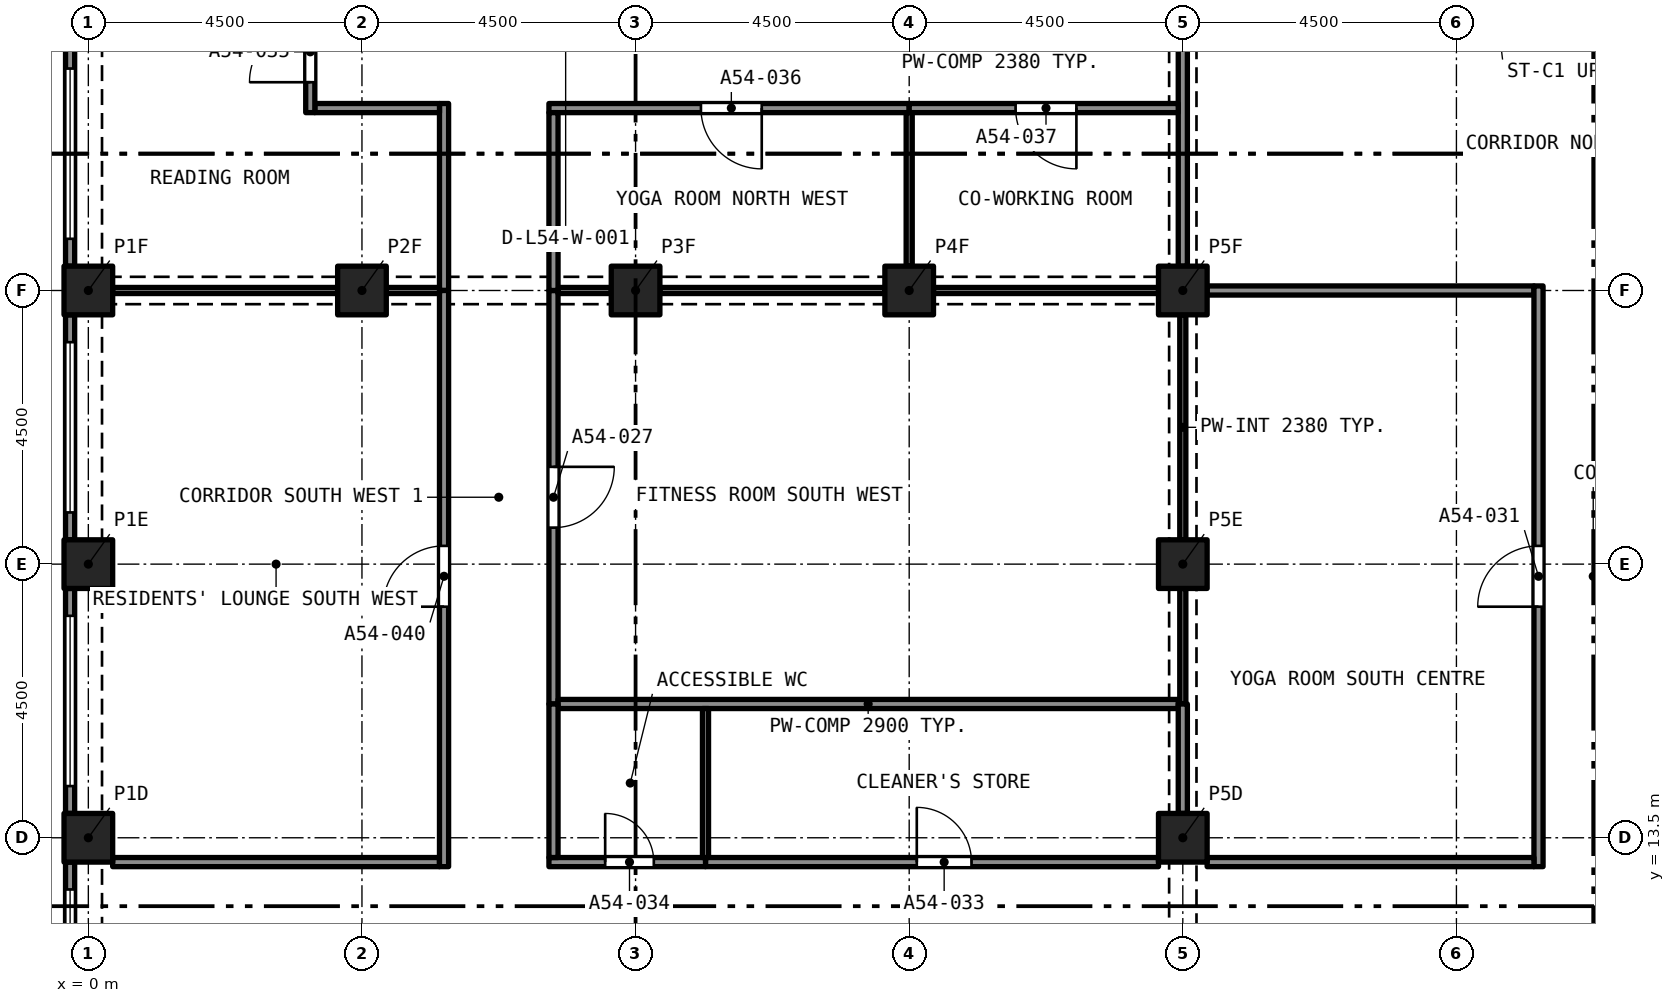
"""IFC4 building model, lengths in metres.
Left out: names, types, materials, properties, quantities, classifications, styles, units other than length and angle.
Written with IfcOpenShell. Run it as: python <this file> out.ifc"""

import sys

from ifc_helpers import new_model, si_unit, direction, frame, frame_2d, origin, origin_2d, place, context, subcontext, project, spatial, rectangle, extrude, element, fill, save


model = new_model("IFC4")
c1 = context("Model", 3, precision=1e-05, world=origin(), true_north=direction((0.0, 1.0)))
c2 = subcontext(c1, "Body", "Model", "MODEL_VIEW")
j1 = project(units=[si_unit("LENGTHUNIT", "METRE"), si_unit("PLANEANGLEUNIT", "RADIAN")], contexts=[c1])
p1 = place(None, origin())
s1 = spatial("IfcSite", under=j1, at=p1, CompositionType="ELEMENT")
p2 = place(p1, origin())
s2 = spatial("IfcBuilding", under=s1, at=p2, CompositionType="ELEMENT")
p3 = place(p2, frame((0.0, 0.0, 195.5)))
s3 = spatial("IfcBuildingStorey", under=s2, at=p3, CompositionType="ELEMENT", Elevation=195.5)
for number, where, z_axis, x_axis in (
    (1, (0.0, 13.5, 0.0), (0.0, 0.0, 1.0), (1.0, 0.0, 0.0)),
    (2, (18.0, 13.5, 0.0), (0.0, 0.0, 1.0), (1.0, 0.0, 0.0)),
    (3, (0.0, 18.0, 0.0), (0.0, 0.0, 1.0), (1.0, 0.0, 0.0)),
    (4, (18.0, 18.0, 0.0), (0.0, 0.0, 1.0), (1.0, 0.0, 0.0)),
    (5, (0.0, 22.5, 0.0), (0.0, 0.0, 1.0), (1.0, 0.0, 0.0)),
    (6, (4.5, 22.5, 0.0), (0.0, 0.0, 1.0), (1.0, 0.0, 0.0)),
    (7, (9.0, 22.5, 0.0), (0.0, 0.0, 1.0), (1.0, 0.0, 0.0)),
    (8, (13.5, 22.5, 0.0), (0.0, 0.0, 1.0), (1.0, 0.0, 0.0)),
    (9, (18.0, 22.5, 0.0), (0.0, 0.0, 1.0), (1.0, 0.0, 0.0)),
):
    element("IfcColumn", number, at=place(p3, frame(where, z_axis=z_axis, x_axis=x_axis)), inside=s3, PredefinedType="COLUMN", context=c2, shape_type="SweptSolid", body=[
        extrude(rectangle(XDim=0.8, YDim=0.8, at=origin_2d()), origin(), (0.0, 0.0, 1.0), 3.2),
    ])
p4 = place(p3, frame((-0.3, 22.9, 0.0), z_axis=(0.0, 0.0, 1.0), x_axis=(0.0, 1.0, 0.0)))
e10 = element("IfcWall", 10, at=p4, inside=s3, PredefinedType="SOLIDWALL", context=c2, shape_type="SweptSolid", body=[
    extrude(rectangle(XDim=3.7, YDim=0.15, at=frame_2d((1.85, 0.0))), origin(), (0.0, 0.0, 1.0), 3.2),
])
p5 = place(p4, frame((0.45, 0.0, 0.45)))
e11 = element("IfcOpeningElement", 11, at=p5, cuts=e10, PredefinedType="OPENING", context=c2, shape_type="SweptSolid", body=[
    extrude(rectangle(XDim=2.8, YDim=1.95, at=frame_2d((1.4, 0.975))), frame((0.0, 0.085, 0.0), z_axis=(0.0, -1.0, 0.0), x_axis=(1.0, 0.0, 0.0)), (0.0, 0.0, 1.0), 0.17),
])
p6 = place(p3, frame((-0.3, 18.4, 0.0), z_axis=(0.0, 0.0, 1.0), x_axis=(0.0, 1.0, 0.0)))
e12 = element("IfcWall", 12, at=p6, inside=s3, PredefinedType="SOLIDWALL", context=c2, shape_type="SweptSolid", body=[
    extrude(rectangle(XDim=3.7, YDim=0.15, at=frame_2d((1.85, 0.0))), origin(), (0.0, 0.0, 1.0), 3.2),
])
p7 = place(p6, frame((0.45, 0.0, 0.45)))
e13 = element("IfcOpeningElement", 13, at=p7, cuts=e12, PredefinedType="OPENING", context=c2, shape_type="SweptSolid", body=[
    extrude(rectangle(XDim=2.8, YDim=1.95, at=frame_2d((1.4, 0.975))), frame((0.0, 0.085, 0.0), z_axis=(0.0, -1.0, 0.0), x_axis=(1.0, 0.0, 0.0)), (0.0, 0.0, 1.0), 0.17),
])
p8 = place(p3, frame((-0.3, 13.9, 0.0), z_axis=(0.0, 0.0, 1.0), x_axis=(0.0, 1.0, 0.0)))
e14 = element("IfcWall", 14, at=p8, inside=s3, PredefinedType="SOLIDWALL", context=c2, shape_type="SweptSolid", body=[
    extrude(rectangle(XDim=3.7, YDim=0.15, at=frame_2d((1.85, 0.0))), origin(), (0.0, 0.0, 1.0), 3.2),
])
p9 = place(p8, frame((0.45, 0.0, 0.45)))
e15 = element("IfcOpeningElement", 15, at=p9, cuts=e14, PredefinedType="OPENING", context=c2, shape_type="SweptSolid", body=[
    extrude(rectangle(XDim=2.8, YDim=1.95, at=frame_2d((1.4, 0.975))), frame((0.0, 0.085, 0.0), z_axis=(0.0, -1.0, 0.0), x_axis=(1.0, 0.0, 0.0)), (0.0, 0.0, 1.0), 0.17),
])
p10 = place(p3, frame((-0.3, 9.4, 0.0), z_axis=(0.0, 0.0, 1.0), x_axis=(0.0, 1.0, 0.0)))
e16 = element("IfcWall", 16, at=p10, inside=s3, PredefinedType="SOLIDWALL", context=c2, shape_type="SweptSolid", body=[
    extrude(rectangle(XDim=3.7, YDim=0.15, at=frame_2d((1.85, 0.0))), origin(), (0.0, 0.0, 1.0), 3.2),
])
p11 = place(p10, frame((0.45, 0.0, 0.45)))
e17 = element("IfcOpeningElement", 17, at=p11, cuts=e16, PredefinedType="OPENING", context=c2, shape_type="SweptSolid", body=[
    extrude(rectangle(XDim=2.8, YDim=1.95, at=frame_2d((1.4, 0.975))), frame((0.0, 0.085, 0.0), z_axis=(0.0, -1.0, 0.0), x_axis=(1.0, 0.0, 0.0)), (0.0, 0.0, 1.0), 0.17),
])
p12 = place(p3, frame((18.0, 18.4, 0.0), z_axis=(0.0, 0.0, 1.0), x_axis=(0.0, 1.0, 0.0)))
e18 = element("IfcWall", 18, at=p12, inside=s3, PredefinedType="PARTITIONING", context=c2, shape_type="SweptSolid", body=[
    extrude(rectangle(XDim=3.7, YDim=0.1, at=frame_2d((1.85, 0.0))), origin(), (0.0, 0.0, 1.0), 2.38),
])
p13 = place(p3, frame((18.0, 15.7, 0.0), z_axis=(0.0, 0.0, 1.0), x_axis=(0.0, 1.0, 0.0)))
e19 = element("IfcWall", 19, at=p13, inside=s3, PredefinedType="PARTITIONING", context=c2, shape_type="SweptSolid", body=[
    extrude(rectangle(XDim=1.9, YDim=0.1, at=frame_2d((0.95, 0.0))), origin(), (0.0, 0.0, 1.0), 2.38),
])
p14 = place(p3, frame((7.65, 22.5, 0.0), z_axis=(0.0, 0.0, 1.0), x_axis=(0.0, -1.0, 0.0)))
e20 = element("IfcWall", 20, at=p14, inside=s3, PredefinedType="PARTITIONING", context=c2, shape_type="SweptSolid", body=[
    extrude(rectangle(XDim=6.8, YDim=0.15, at=frame_2d((3.4, 0.0))), origin(), (0.0, 0.0, 1.0), 2.9),
])
p15 = place(p14, frame((2.9, 0.0, 0.0)))
e21 = element("IfcOpeningElement", 21, at=p15, cuts=e20, PredefinedType="OPENING", context=c2, shape_type="SweptSolid", body=[
    extrude(rectangle(XDim=1.0, YDim=2.1, at=frame_2d((0.5, 1.05))), frame((0.0, 0.085, 0.0), z_axis=(0.0, -1.0, 0.0), x_axis=(1.0, 0.0, 0.0)), (0.0, 0.0, 1.0), 0.17),
])
p16 = place(p3, frame((7.725, 22.5, 0.0), z_axis=(0.0, 0.0, 1.0), x_axis=(1.0, 0.0, 0.0)))
e22 = element("IfcWall", 22, at=p16, inside=s3, PredefinedType="PARTITIONING", context=c2, shape_type="SweptSolid", body=[
    extrude(rectangle(XDim=0.875, YDim=0.1, at=frame_2d((0.438, 0.0))), origin(), (0.0, 0.0, 1.0), 2.38),
])
for number, where, z_axis, x_axis in (
    (23, (9.4, 22.5, 0.0), (0.0, 0.0, 1.0), (1.0, 0.0, 0.0)),
    (24, (13.9, 22.5, 0.0), (0.0, 0.0, 1.0), (1.0, 0.0, 0.0)),
):
    element("IfcWall", number, at=place(p3, frame(where, z_axis=z_axis, x_axis=x_axis)), inside=s3, PredefinedType="PARTITIONING", context=c2, shape_type="SweptSolid", body=[
        extrude(rectangle(XDim=3.7, YDim=0.1, at=frame_2d((1.85, 0.0))), origin(), (0.0, 0.0, 1.0), 2.38),
    ])
p17 = place(p3, frame((7.725, 15.7, 0.0), z_axis=(0.0, 0.0, 1.0), x_axis=(1.0, 0.0, 0.0)))
e25 = element("IfcWall", 25, at=p17, inside=s3, PredefinedType="PARTITIONING", context=c2, shape_type="SweptSolid", body=[
    extrude(rectangle(XDim=10.2, YDim=0.15, at=frame_2d((5.1, 0.0))), origin(), (0.0, 0.0, 1.0), 2.9),
])
p18 = place(p3, frame((18.4, 22.5, 0.0), z_axis=(0.0, 0.0, 1.0), x_axis=(1.0, 0.0, 0.0)))
e26 = element("IfcWall", 26, at=p18, inside=s3, PredefinedType="PARTITIONING", context=c2, shape_type="SweptSolid", body=[
    extrude(rectangle(XDim=5.375, YDim=0.15, at=frame_2d((2.688, 0.0))), origin(), (0.0, 0.0, 1.0), 2.75),
])
p19 = place(p3, frame((18.0, 22.9, 0.0), z_axis=(0.0, 0.0, 1.0), x_axis=(0.0, 1.0, 0.0)))
e27 = element("IfcWall", 27, at=p19, inside=s3, PredefinedType="PARTITIONING", context=c2, shape_type="SweptSolid", body=[
    extrude(rectangle(XDim=3.7, YDim=0.15, at=frame_2d((1.85, 0.0))), origin(), (0.0, 0.0, 1.0), 2.38),
])
p20 = place(p3, frame((23.85, 13.025, 0.0), z_axis=(0.0, 0.0, 1.0), x_axis=(0.0, 1.0, 0.0)))
e28 = element("IfcWall", 28, at=p20, inside=s3, PredefinedType="PARTITIONING", context=c2, shape_type="SweptSolid", body=[
    extrude(rectangle(XDim=9.55, YDim=0.15, at=frame_2d((4.775, 0.0))), origin(), (0.0, 0.0, 1.0), 2.75),
])
p21 = place(p20, frame((4.275, 0.0, 0.0)))
e29 = element("IfcOpeningElement", 29, at=p21, cuts=e28, PredefinedType="OPENING", context=c2, shape_type="SweptSolid", body=[
    extrude(rectangle(XDim=1.0, YDim=2.1, at=frame_2d((0.5, 1.05))), frame((0.0, 0.085, 0.0), z_axis=(0.0, -1.0, 0.0), x_axis=(1.0, 0.0, 0.0)), (0.0, 0.0, 1.0), 0.17),
])
p22 = place(p3, frame((18.4, 13.1, 0.0), z_axis=(0.0, 0.0, 1.0), x_axis=(1.0, 0.0, 0.0)))
e30 = element("IfcWall", 30, at=p22, inside=s3, PredefinedType="PARTITIONING", context=c2, shape_type="SweptSolid", body=[
    extrude(rectangle(XDim=5.375, YDim=0.15, at=frame_2d((2.688, 0.0))), origin(), (0.0, 0.0, 1.0), 2.75),
])
p23 = place(p3, frame((10.15, 13.1, 0.0), z_axis=(0.0, 0.0, 1.0), x_axis=(1.0, 0.0, 0.0)))
e31 = element("IfcWall", 31, at=p23, inside=s3, PredefinedType="PARTITIONING", context=c2, shape_type="SweptSolid", body=[
    extrude(rectangle(XDim=7.45, YDim=0.15, at=frame_2d((3.725, 0.0))), origin(), (0.0, 0.0, 1.0), 2.9),
])
p24 = place(p23, frame((3.475, 0.0, 0.0)))
e32 = element("IfcOpeningElement", 32, at=p24, cuts=e31, PredefinedType="OPENING", context=c2, shape_type="SweptSolid", body=[
    extrude(rectangle(XDim=0.9, YDim=2.1, at=frame_2d((0.45, 1.05))), frame((0.0, 0.085, 0.0), z_axis=(0.0, -1.0, 0.0), x_axis=(1.0, 0.0, 0.0)), (0.0, 0.0, 1.0), 0.17),
])
p25 = place(p3, frame((7.575, 13.1, 0.0), z_axis=(0.0, 0.0, 1.0), x_axis=(1.0, 0.0, 0.0)))
e33 = element("IfcWall", 33, at=p25, inside=s3, PredefinedType="PARTITIONING", context=c2, shape_type="SweptSolid", body=[
    extrude(rectangle(XDim=2.575, YDim=0.15, at=frame_2d((1.288, 0.0))), origin(), (0.0, 0.0, 1.0), 2.9),
])
p26 = place(p25, frame((0.925, 0.0, 0.0)))
e34 = element("IfcOpeningElement", 34, at=p26, cuts=e33, PredefinedType="OPENING", context=c2, shape_type="SweptSolid", body=[
    extrude(rectangle(XDim=0.8, YDim=2.1, at=frame_2d((0.4, 1.05))), frame((0.0, 0.085, 0.0), z_axis=(0.0, -1.0, 0.0), x_axis=(1.0, 0.0, 0.0)), (0.0, 0.0, 1.0), 0.17),
])
p27 = place(p3, frame((0.4, 13.1, 0.0), z_axis=(0.0, 0.0, 1.0), x_axis=(1.0, 0.0, 0.0)))
e35 = element("IfcWall", 35, at=p27, inside=s3, PredefinedType="PARTITIONING", context=c2, shape_type="SweptSolid", body=[
    extrude(rectangle(XDim=5.375, YDim=0.15, at=frame_2d((2.688, 0.0))), origin(), (0.0, 0.0, 1.0), 2.9),
])
p28 = place(p3, frame((18.0, 13.9, 0.0), z_axis=(0.0, 0.0, 1.0), x_axis=(0.0, 1.0, 0.0)))
e36 = element("IfcWall", 36, at=p28, inside=s3, PredefinedType="PARTITIONING", context=c2, shape_type="SweptSolid", body=[
    extrude(rectangle(XDim=1.8, YDim=0.15, at=frame_2d((0.9, 0.0))), origin(), (0.0, 0.0, 1.0), 2.38),
])
p29 = place(p3, frame((5.85, 22.5, 0.0), z_axis=(0.0, 0.0, 1.0), x_axis=(0.0, 1.0, 0.0)))
e37 = element("IfcWall", 37, at=p29, inside=s3, PredefinedType="PARTITIONING", context=c2, shape_type="SweptSolid", body=[
    extrude(rectangle(XDim=3.075, YDim=0.15, at=frame_2d((1.538, 0.0))), origin(), (0.0, 0.0, 1.0), 2.9),
])
p30 = place(p3, frame((3.725, 25.5, 0.0), z_axis=(0.0, 0.0, 1.0), x_axis=(1.0, 0.0, 0.0)))
e38 = element("IfcWall", 38, at=p30, inside=s3, PredefinedType="PARTITIONING", context=c2, shape_type="SweptSolid", body=[
    extrude(rectangle(XDim=2.05, YDim=0.15, at=frame_2d((1.025, 0.0))), origin(), (0.0, 0.0, 1.0), 2.9),
])
p31 = place(p3, frame((3.65, 25.425, 0.0), z_axis=(0.0, 0.0, 1.0), x_axis=(0.0, 1.0, 0.0)))
e39 = element("IfcWall", 39, at=p31, inside=s3, PredefinedType="PARTITIONING", context=c2, shape_type="SweptSolid", body=[
    extrude(rectangle(XDim=1.925, YDim=0.15, at=frame_2d((0.962, 0.0))), origin(), (0.0, 0.0, 1.0), 2.9),
])
p32 = place(p31, frame((0.5, 0.0, 0.0)))
e40 = element("IfcOpeningElement", 40, at=p32, cuts=e39, PredefinedType="OPENING", context=c2, shape_type="SweptSolid", body=[
    extrude(rectangle(XDim=1.0, YDim=2.1, at=frame_2d((0.5, 1.05))), frame((0.0, 0.085, 0.0), z_axis=(0.0, -1.0, 0.0), x_axis=(1.0, 0.0, 0.0)), (0.0, 0.0, 1.0), 0.17),
])
p33 = place(p3, frame((13.5, 25.5, 0.0), z_axis=(0.0, 0.0, 1.0), x_axis=(-1.0, 0.0, 0.0)))
e41 = element("IfcWall", 41, at=p33, inside=s3, PredefinedType="PARTITIONING", context=c2, shape_type="SweptSolid", body=[
    extrude(rectangle(XDim=5.925, YDim=0.15, at=frame_2d((2.962, 0.0))), origin(), (0.0, 0.0, 1.0), 2.9),
])
p34 = place(p33, frame((2.425, 0.0, 0.0)))
e42 = element("IfcOpeningElement", 42, at=p34, cuts=e41, PredefinedType="OPENING", context=c2, shape_type="SweptSolid", body=[
    extrude(rectangle(XDim=1.0, YDim=2.1, at=frame_2d((0.5, 1.05))), frame((0.0, 0.085, 0.0), z_axis=(0.0, -1.0, 0.0), x_axis=(1.0, 0.0, 0.0)), (0.0, 0.0, 1.0), 0.17),
])
p35 = place(p3, frame((7.65, 22.5, 0.0), z_axis=(0.0, 0.0, 1.0), x_axis=(0.0, 1.0, 0.0)))
e43 = element("IfcWall", 43, at=p35, inside=s3, PredefinedType="PARTITIONING", context=c2, shape_type="SweptSolid", body=[
    extrude(rectangle(XDim=2.925, YDim=0.15, at=frame_2d((1.462, 0.0))), origin(), (0.0, 0.0, 1.0), 2.9),
])
p36 = place(p3, frame((17.925, 25.5, 0.0), z_axis=(0.0, 0.0, 1.0), x_axis=(-1.0, 0.0, 0.0)))
e44 = element("IfcWall", 44, at=p36, inside=s3, PredefinedType="PARTITIONING", context=c2, shape_type="SweptSolid", body=[
    extrude(rectangle(XDim=4.425, YDim=0.15, at=frame_2d((2.212, 0.0))), origin(), (0.0, 0.0, 1.0), 2.9),
])
p37 = place(p36, frame((1.675, 0.0, 0.0)))
e45 = element("IfcOpeningElement", 45, at=p37, cuts=e44, PredefinedType="OPENING", context=c2, shape_type="SweptSolid", body=[
    extrude(rectangle(XDim=1.0, YDim=2.1, at=frame_2d((0.5, 1.05))), frame((0.0, 0.085, 0.0), z_axis=(0.0, -1.0, 0.0), x_axis=(1.0, 0.0, 0.0)), (0.0, 0.0, 1.0), 0.17),
])
p38 = place(p3, frame((7.65, 13.175, 0.0), z_axis=(0.0, 0.0, 1.0), x_axis=(0.0, 1.0, 0.0)))
e46 = element("IfcWall", 46, at=p38, inside=s3, PredefinedType="PARTITIONING", context=c2, shape_type="SweptSolid", body=[
    extrude(rectangle(XDim=2.525, YDim=0.15, at=frame_2d((1.262, 0.0))), origin(), (0.0, 0.0, 1.0), 2.9),
])
p39 = place(p3, frame((5.85, 13.025, 0.0), z_axis=(0.0, 0.0, 1.0), x_axis=(0.0, 1.0, 0.0)))
e47 = element("IfcWall", 47, at=p39, inside=s3, PredefinedType="PARTITIONING", context=c2, shape_type="SweptSolid", body=[
    extrude(rectangle(XDim=9.475, YDim=0.15, at=frame_2d((4.738, 0.0))), origin(), (0.0, 0.0, 1.0), 2.9),
])
p40 = place(p39, frame((4.275, 0.0, 0.0)))
e48 = element("IfcOpeningElement", 48, at=p40, cuts=e47, PredefinedType="OPENING", context=c2, shape_type="SweptSolid", body=[
    extrude(rectangle(XDim=1.0, YDim=2.1, at=frame_2d((0.5, 1.05))), frame((0.0, 0.085, 0.0), z_axis=(0.0, -1.0, 0.0), x_axis=(1.0, 0.0, 0.0)), (0.0, 0.0, 1.0), 0.17),
])
p41 = place(p3, frame((4.9, 22.5, 0.0), z_axis=(0.0, 0.0, 1.0), x_axis=(1.0, 0.0, 0.0)))
e49 = element("IfcWall", 49, at=p41, inside=s3, PredefinedType="PARTITIONING", context=c2, shape_type="SweptSolid", body=[
    extrude(rectangle(XDim=0.875, YDim=0.1, at=frame_2d((0.438, 0.0))), origin(), (0.0, 0.0, 1.0), 2.38),
])
p42 = place(p3, frame((0.4, 22.5, 0.0), z_axis=(0.0, 0.0, 1.0), x_axis=(1.0, 0.0, 0.0)))
e50 = element("IfcWall", 50, at=p42, inside=s3, PredefinedType="PARTITIONING", context=c2, shape_type="SweptSolid", body=[
    extrude(rectangle(XDim=3.7, YDim=0.1, at=frame_2d((1.85, 0.0))), origin(), (0.0, 0.0, 1.0), 2.38),
])
p43 = place(p3, frame((13.5, 22.9, 0.0), z_axis=(0.0, 0.0, 1.0), x_axis=(0.0, 1.0, 0.0)))
e51 = element("IfcWall", 51, at=p43, inside=s3, PredefinedType="PARTITIONING", context=c2, shape_type="SweptSolid", body=[
    extrude(rectangle(XDim=2.525, YDim=0.1, at=frame_2d((1.263, 0.0))), origin(), (0.0, 0.0, 1.0), 2.9),
])
p44 = place(p3, frame((10.15, 13.175, 0.0), z_axis=(0.0, 0.0, 1.0), x_axis=(0.0, 1.0, 0.0)))
e52 = element("IfcWall", 52, at=p44, inside=s3, PredefinedType="PARTITIONING", context=c2, shape_type="SweptSolid", body=[
    extrude(rectangle(XDim=2.45, YDim=0.1, at=frame_2d((1.225, 0.0))), origin(), (0.0, 0.0, 1.0), 2.9),
])
p45 = place(p5, origin())
e53 = element("IfcWindow", 53, at=p45, inside=s3, PartitioningType="SINGLE_PANEL", PredefinedType="WINDOW", context=c2, shape_type="SweptSolid", body=[
    extrude(rectangle(XDim=2.8, YDim=1.95, at=frame_2d((1.4, 0.975))), frame((0.0, 0.03, 0.0), z_axis=(0.0, -1.0, 0.0), x_axis=(1.0, 0.0, 0.0)), (0.0, 0.0, 1.0), 0.06),
])
fill(e11, e53)
p46 = place(p7, origin())
e54 = element("IfcWindow", 54, at=p46, inside=s3, PartitioningType="SINGLE_PANEL", PredefinedType="WINDOW", context=c2, shape_type="SweptSolid", body=[
    extrude(rectangle(XDim=2.8, YDim=1.95, at=frame_2d((1.4, 0.975))), frame((0.0, 0.03, 0.0), z_axis=(0.0, -1.0, 0.0), x_axis=(1.0, 0.0, 0.0)), (0.0, 0.0, 1.0), 0.06),
])
fill(e13, e54)
p47 = place(p9, origin())
e55 = element("IfcWindow", 55, at=p47, inside=s3, PartitioningType="SINGLE_PANEL", PredefinedType="WINDOW", context=c2, shape_type="SweptSolid", body=[
    extrude(rectangle(XDim=2.8, YDim=1.95, at=frame_2d((1.4, 0.975))), frame((0.0, 0.03, 0.0), z_axis=(0.0, -1.0, 0.0), x_axis=(1.0, 0.0, 0.0)), (0.0, 0.0, 1.0), 0.06),
])
fill(e15, e55)
p48 = place(p11, origin())
e56 = element("IfcWindow", 56, at=p48, inside=s3, PartitioningType="SINGLE_PANEL", PredefinedType="WINDOW", context=c2, shape_type="SweptSolid", body=[
    extrude(rectangle(XDim=2.8, YDim=1.95, at=frame_2d((1.4, 0.975))), frame((0.0, 0.03, 0.0), z_axis=(0.0, -1.0, 0.0), x_axis=(1.0, 0.0, 0.0)), (0.0, 0.0, 1.0), 0.06),
])
fill(e17, e56)
p49 = place(p15, origin())
e57 = element("IfcDoor", 57, at=p49, inside=s3, OperationType="SINGLE_SWING_LEFT", PredefinedType="DOOR", context=c2, shape_type="SweptSolid", body=[
    extrude(rectangle(XDim=1.0, YDim=2.1, at=frame_2d((0.5, 1.05))), frame((0.0, 0.025, 0.0), z_axis=(0.0, -1.0, 0.0), x_axis=(1.0, 0.0, 0.0)), (0.0, 0.0, 1.0), 0.05),
])
fill(e21, e57)
p50 = place(p21, origin())
e58 = element("IfcDoor", 58, at=p50, inside=s3, OperationType="SINGLE_SWING_RIGHT", PredefinedType="DOOR", context=c2, shape_type="SweptSolid", body=[
    extrude(rectangle(XDim=1.0, YDim=2.1, at=frame_2d((0.5, 1.05))), frame((0.0, 0.025, 0.0), z_axis=(0.0, -1.0, 0.0), x_axis=(1.0, 0.0, 0.0)), (0.0, 0.0, 1.0), 0.05),
])
fill(e29, e58)
p51 = place(p24, origin())
e59 = element("IfcDoor", 59, at=p51, inside=s3, OperationType="SINGLE_SWING_RIGHT", PredefinedType="DOOR", context=c2, shape_type="SweptSolid", body=[
    extrude(rectangle(XDim=0.9, YDim=2.1, at=frame_2d((0.45, 1.05))), frame((0.0, 0.025, 0.0), z_axis=(0.0, -1.0, 0.0), x_axis=(1.0, 0.0, 0.0)), (0.0, 0.0, 1.0), 0.05),
])
fill(e32, e59)
p52 = place(p26, origin())
e60 = element("IfcDoor", 60, at=p52, inside=s3, OperationType="SINGLE_SWING_RIGHT", PredefinedType="DOOR", context=c2, shape_type="SweptSolid", body=[
    extrude(rectangle(XDim=0.8, YDim=2.1, at=frame_2d((0.4, 1.05))), frame((0.0, 0.025, 0.0), z_axis=(0.0, -1.0, 0.0), x_axis=(1.0, 0.0, 0.0)), (0.0, 0.0, 1.0), 0.05),
])
fill(e34, e60)
p53 = place(p32, origin())
e61 = element("IfcDoor", 61, at=p53, inside=s3, OperationType="SINGLE_SWING_RIGHT", PredefinedType="DOOR", context=c2, shape_type="SweptSolid", body=[
    extrude(rectangle(XDim=1.0, YDim=2.1, at=frame_2d((0.5, 1.05))), frame((0.0, 0.025, 0.0), z_axis=(0.0, -1.0, 0.0), x_axis=(1.0, 0.0, 0.0)), (0.0, 0.0, 1.0), 0.05),
])
fill(e40, e61)
p54 = place(p34, origin())
e62 = element("IfcDoor", 62, at=p54, inside=s3, OperationType="SINGLE_SWING_LEFT", PredefinedType="DOOR", context=c2, shape_type="SweptSolid", body=[
    extrude(rectangle(XDim=1.0, YDim=2.1, at=frame_2d((0.5, 1.05))), frame((0.0, 0.025, 0.0), z_axis=(0.0, -1.0, 0.0), x_axis=(1.0, 0.0, 0.0)), (0.0, 0.0, 1.0), 0.05),
])
fill(e42, e62)
p55 = place(p37, origin())
e63 = element("IfcDoor", 63, at=p55, inside=s3, OperationType="SINGLE_SWING_LEFT", PredefinedType="DOOR", context=c2, shape_type="SweptSolid", body=[
    extrude(rectangle(XDim=1.0, YDim=2.1, at=frame_2d((0.5, 1.05))), frame((0.0, 0.025, 0.0), z_axis=(0.0, -1.0, 0.0), x_axis=(1.0, 0.0, 0.0)), (0.0, 0.0, 1.0), 0.05),
])
fill(e45, e63)
p56 = place(p40, origin())
e64 = element("IfcDoor", 64, at=p56, inside=s3, OperationType="SINGLE_SWING_RIGHT", PredefinedType="DOOR", context=c2, shape_type="SweptSolid", body=[
    extrude(rectangle(XDim=1.0, YDim=2.1, at=frame_2d((0.5, 1.05))), frame((0.0, 0.025, 0.0), z_axis=(0.0, -1.0, 0.0), x_axis=(1.0, 0.0, 0.0)), (0.0, 0.0, 1.0), 0.05),
])
fill(e48, e64)
save(model, sys.argv[1])
